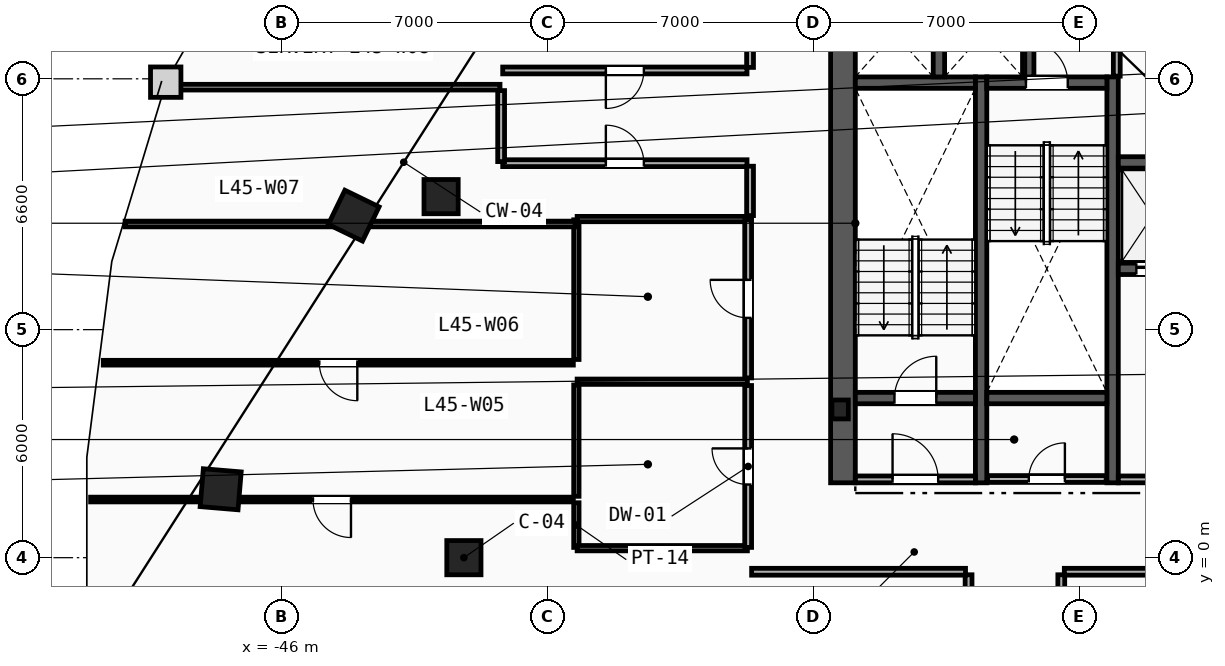
"""IFC4 building model, lengths in metres.
Left out: names, types, materials, properties, quantities, classifications, styles, units other than length and angle.
Written with IfcOpenShell. Run it as: python <this file> out.ifc"""

import sys

from ifc_helpers import new_model, si_unit, direction, frame, frame_2d, origin, origin_2d, place, context, subcontext, project, spatial, rectangle, i_section, extrude, element, fill, save


model = new_model("IFC4")
c1 = context("Model", 3, precision=1e-05, world=origin(), true_north=direction((0.0, 1.0)))
c2 = subcontext(c1, "Body", "Model", "MODEL_VIEW")
j1 = project(units=[si_unit("LENGTHUNIT", "METRE"), si_unit("PLANEANGLEUNIT", "RADIAN")], contexts=[c1])
p1 = place(None, origin())
s1 = spatial("IfcSite", under=j1, at=p1, CompositionType="ELEMENT")
p2 = place(p1, origin())
s2 = spatial("IfcBuilding", under=s1, at=p2, CompositionType="ELEMENT")
p3 = place(p2, frame((0.0, 0.0, 172.8)))
s3 = spatial("IfcBuildingStorey", under=s2, at=p3, CompositionType="ELEMENT", Elevation=172.8)
p4 = place(p3, frame((-31.3, 3.9, 0.0), z_axis=(0.0, 0.0, 1.0), x_axis=(1.0, 0.0, 0.0)))
e1 = element("IfcColumn", 1, at=p4, inside=s3, PredefinedType="COLUMN", context=c2, shape_type="SweptSolid", body=[
    extrude(i_section(OverallWidth=0.432, OverallDepth=0.498, WebThickness=0.056, FlangeThickness=0.089, FilletRadius=0.018, at=origin_2d()), origin(), (0.0, 0.0, 1.0), 3.6),
])
for number, where, z_axis, x_axis in (
    (2, (-41.2, 0.0, 0.0), (0.0, 0.0, 1.0), (1.0, 0.0, 0.0)),
    (3, (-41.8, 9.5, 0.0), (0.0, 0.0, 1.0), (1.0, 0.0, 0.0)),
):
    element("IfcColumn", number, at=place(p3, frame(where, z_axis=z_axis, x_axis=x_axis)), inside=s3, PredefinedType="COLUMN", context=c2, shape_type="SweptSolid", body=[
        extrude(rectangle(XDim=0.9, YDim=0.9, at=origin_2d()), origin(), (0.0, 0.0, 1.0), 3.6),
    ])
for number, where, z_axis, x_axis in (
    (4, (-44.1, 9.0, 0.0), (0.0, 0.0, 1.0), (-0.437, -0.899, 0.0)),
    (5, (-47.6, 1.8, 0.0), (0.0, 0.0, 1.0), (-0.084, -0.997, 0.0)),
):
    element("IfcColumn", number, at=place(p3, frame(where, z_axis=z_axis, x_axis=x_axis)), inside=s3, PredefinedType="COLUMN", context=c2, shape_type="SweptSolid", body=[
        extrude(rectangle(XDim=1.0, YDim=1.0, at=origin_2d()), origin(), (0.0, 0.0, 1.0), 3.6),
    ])
p5 = place(p3, frame((-31.225, 1.97, 0.0), z_axis=(0.0, 0.0, 1.0), x_axis=(0.0, 1.0, 0.0)))
e6 = element("IfcWall", 6, at=p5, inside=s3, PredefinedType="SHEAR", context=c2, shape_type="SweptSolid", body=[
    extrude(rectangle(XDim=13.33, YDim=0.65, at=frame_2d((6.665, 0.0))), origin(), (0.0, 0.0, 1.0), 3.36),
])
for number, where, z_axis, x_axis in (
    (7, (-27.59, 1.97, 0.0), (0.0, 0.0, 1.0), (0.0, 1.0, 0.0)),
    (8, (-24.13, 1.97, 0.0), (0.0, 0.0, 1.0), (0.0, 1.0, 0.0)),
):
    element("IfcWall", number, at=place(p3, frame(where, z_axis=z_axis, x_axis=x_axis)), inside=s3, PredefinedType="SHEAR", context=c2, shape_type="SweptSolid", body=[
        extrude(rectangle(XDim=10.68, YDim=0.3, at=frame_2d((5.34, 0.0))), origin(), (0.0, 0.0, 1.0), 3.36),
    ])
p6 = place(p3, frame((-30.9, 4.2, 0.0), z_axis=(0.0, 0.0, 1.0), x_axis=(1.0, 0.0, 0.0)))
e9 = element("IfcWall", 9, at=p6, inside=s3, PredefinedType="SHEAR", context=c2, shape_type="SweptSolid", body=[
    extrude(rectangle(XDim=3.16, YDim=0.3, at=frame_2d((1.58, 0.0))), origin(), (0.0, 0.0, 1.0), 3.36),
])
p7 = place(p6, frame((1.03, 0.0, 0.0)))
e10 = element("IfcOpeningElement", 10, at=p7, cuts=e9, PredefinedType="OPENING", context=c2, shape_type="SweptSolid", body=[
    extrude(rectangle(XDim=1.1, YDim=2.15, at=frame_2d((0.55, 1.075))), frame((0.0, 0.16, 0.0), z_axis=(0.0, -1.0, 0.0), x_axis=(1.0, 0.0, 0.0)), (0.0, 0.0, 1.0), 0.32),
])
p8 = place(p3, frame((-30.9, 12.5, 0.0), z_axis=(0.0, 0.0, 1.0), x_axis=(1.0, 0.0, 0.0)))
e11 = element("IfcWall", 11, at=p8, inside=s3, PredefinedType="SHEAR", context=c2, shape_type="SweptSolid", body=[
    extrude(rectangle(XDim=3.16, YDim=0.3, at=frame_2d((1.58, 0.0))), origin(), (0.0, 0.0, 1.0), 3.36),
])
p9 = place(p3, frame((-27.44, 12.5, 0.0), z_axis=(0.0, 0.0, 1.0), x_axis=(1.0, 0.0, 0.0)))
e12 = element("IfcWall", 12, at=p9, inside=s3, PredefinedType="SHEAR", context=c2, shape_type="SweptSolid", body=[
    extrude(rectangle(XDim=3.16, YDim=0.3, at=frame_2d((1.58, 0.0))), origin(), (0.0, 0.0, 1.0), 3.36),
])
p10 = place(p9, frame((1.03, 0.0, 0.0)))
e13 = element("IfcOpeningElement", 13, at=p10, cuts=e12, PredefinedType="OPENING", context=c2, shape_type="SweptSolid", body=[
    extrude(rectangle(XDim=1.1, YDim=2.15, at=frame_2d((0.55, 1.075))), frame((0.0, 0.16, 0.0), z_axis=(0.0, -1.0, 0.0), x_axis=(1.0, 0.0, 0.0)), (0.0, 0.0, 1.0), 0.32),
])
p11 = place(p3, frame((-27.44, 4.2, 0.0), z_axis=(0.0, 0.0, 1.0), x_axis=(1.0, 0.0, 0.0)))
e14 = element("IfcWall", 14, at=p11, inside=s3, PredefinedType="SHEAR", context=c2, shape_type="SweptSolid", body=[
    extrude(rectangle(XDim=3.16, YDim=0.3, at=frame_2d((1.58, 0.0))), origin(), (0.0, 0.0, 1.0), 3.36),
])
p12 = place(p3, frame((-23.98, 2.06, 0.0), z_axis=(0.0, 0.0, 1.0), x_axis=(1.0, 0.0, 0.0)))
e15 = element("IfcWall", 15, at=p12, inside=s3, PredefinedType="PARTITIONING", context=c2, shape_type="SweptSolid", body=[
    extrude(rectangle(XDim=3.0, YDim=0.18, at=frame_2d((1.5, 0.0))), origin(), (0.0, 0.0, 1.0), 3.36),
])
p13 = place(p12, frame((0.9, 0.0, 0.0)))
e16 = element("IfcOpeningElement", 16, at=p13, cuts=e15, PredefinedType="OPENING", context=c2, shape_type="SweptSolid", body=[
    extrude(rectangle(XDim=1.2, YDim=2.15, at=frame_2d((0.6, 1.075))), frame((0.0, 0.1, 0.0), z_axis=(0.0, -1.0, 0.0), x_axis=(1.0, 0.0, 0.0)), (0.0, 0.0, 1.0), 0.2),
])
p14 = place(p3, frame((-30.9, 2.06, 0.0), z_axis=(0.0, 0.0, 1.0), x_axis=(1.0, 0.0, 0.0)))
e17 = element("IfcWall", 17, at=p14, inside=s3, PredefinedType="PARTITIONING", context=c2, shape_type="SweptSolid", body=[
    extrude(rectangle(XDim=3.16, YDim=0.18, at=frame_2d((1.58, 0.0))), origin(), (0.0, 0.0, 1.0), 3.36),
])
p15 = place(p14, frame((0.98, 0.0, 0.0)))
e18 = element("IfcOpeningElement", 18, at=p15, cuts=e17, PredefinedType="OPENING", context=c2, shape_type="SweptSolid", body=[
    extrude(rectangle(XDim=1.2, YDim=2.15, at=frame_2d((0.6, 1.075))), frame((0.0, 0.1, 0.0), z_axis=(0.0, -1.0, 0.0), x_axis=(1.0, 0.0, 0.0)), (0.0, 0.0, 1.0), 0.2),
])
p16 = place(p3, frame((-23.98, 7.6, 0.0), z_axis=(0.0, 0.0, 1.0), x_axis=(1.0, 0.0, 0.0)))
e19 = element("IfcWall", 19, at=p16, inside=s3, PredefinedType="SHEAR", context=c2, shape_type="SweptSolid", body=[
    extrude(rectangle(XDim=2.1, YDim=0.3, at=frame_2d((1.05, 0.0))), origin(), (0.0, 0.0, 1.0), 3.36),
])
p17 = place(p16, frame((0.475, 0.0, 0.0)))
e20 = element("IfcOpeningElement", 20, at=p17, cuts=e19, PredefinedType="OPENING", context=c2, shape_type="SweptSolid", body=[
    extrude(rectangle(XDim=1.15, YDim=2.2, at=frame_2d((0.575, 1.1))), frame((0.0, 0.16, 0.0), z_axis=(0.0, -1.0, 0.0), x_axis=(1.0, 0.0, 0.0)), (0.0, 0.0, 1.0), 0.32),
])
p18 = place(p3, frame((-23.98, 10.4, 0.0), z_axis=(0.0, 0.0, 1.0), x_axis=(1.0, 0.0, 0.0)))
e21 = element("IfcWall", 21, at=p18, inside=s3, PredefinedType="SHEAR", context=c2, shape_type="SweptSolid", body=[
    extrude(rectangle(XDim=2.1, YDim=0.3, at=frame_2d((1.05, 0.0))), origin(), (0.0, 0.0, 1.0), 3.36),
])
for number, where, z_axis, x_axis in (
    (22, (-28.7, 12.65, 0.0), (0.0, 0.0, 1.0), (0.0, 1.0, 0.0)),
    (23, (-26.35, 12.65, 0.0), (0.0, 0.0, 1.0), (0.0, 1.0, 0.0)),
):
    element("IfcWall", number, at=place(p3, frame(where, z_axis=z_axis, x_axis=x_axis)), inside=s3, PredefinedType="SHEAR", context=c2, shape_type="SweptSolid", body=[
        extrude(rectangle(XDim=2.3, YDim=0.3, at=frame_2d((1.15, 0.0))), origin(), (0.0, 0.0, 1.0), 3.36),
    ])
p19 = place(p3, frame((-27.42, 2.07, 0.0), z_axis=(0.0, 0.0, 1.0), x_axis=(1.0, 0.0, 0.0)))
e24 = element("IfcWall", 24, at=p19, inside=s3, PredefinedType="PARTITIONING", context=c2, shape_type="SweptSolid", body=[
    extrude(rectangle(XDim=3.12, YDim=0.18, at=frame_2d((1.56, 0.0))), origin(), (0.0, 0.0, 1.0), 3.36),
])
p20 = place(p19, frame((1.085, 0.0, 0.0)))
e25 = element("IfcOpeningElement", 25, at=p20, cuts=e24, PredefinedType="OPENING", context=c2, shape_type="SweptSolid", body=[
    extrude(rectangle(XDim=0.95, YDim=2.1, at=frame_2d((0.475, 1.05))), frame((0.0, 0.1, 0.0), z_axis=(0.0, -1.0, 0.0), x_axis=(1.0, 0.0, 0.0)), (0.0, 0.0, 1.0), 0.2),
])
p21 = place(p3, frame((-24.02, 12.67, 0.0), z_axis=(0.0, 0.0, 1.0), x_axis=(0.0, 1.0, 0.0)))
e26 = element("IfcWall", 26, at=p21, inside=s3, PredefinedType="PARTITIONING", context=c2, shape_type="SweptSolid", body=[
    extrude(rectangle(XDim=2.26, YDim=0.18, at=frame_2d((1.13, 0.0))), origin(), (0.0, 0.0, 1.0), 3.36),
])
p22 = place(p21, frame((0.655, 0.0, 0.0)))
e27 = element("IfcOpeningElement", 27, at=p22, cuts=e26, PredefinedType="OPENING", context=c2, shape_type="SweptSolid", body=[
    extrude(rectangle(XDim=0.95, YDim=2.1, at=frame_2d((0.475, 1.05))), frame((0.0, 0.1, 0.0), z_axis=(0.0, -1.0, 0.0), x_axis=(1.0, 0.0, 0.0)), (0.0, 0.0, 1.0), 0.2),
])
p23 = place(p3, frame((-38.24, 0.27, 0.0), z_axis=(0.0, 0.0, 1.0), x_axis=(0.0, 1.0, 0.0)))
e28 = element("IfcWall", 28, at=p23, inside=s3, PredefinedType="PARTITIONING", context=c2, shape_type="SweptSolid", body=[
    extrude(rectangle(XDim=1.175, YDim=0.14, at=frame_2d((0.587, 0.0))), origin(), (0.0, 0.0, 1.0), 3.36),
])
p24 = place(p3, frame((-38.24, 1.615, 0.0), z_axis=(0.0, 0.0, 1.0), x_axis=(0.0, 1.0, 0.0)))
e29 = element("IfcWall", 29, at=p24, inside=s3, PredefinedType="PARTITIONING", context=c2, shape_type="SweptSolid", body=[
    extrude(rectangle(XDim=2.93, YDim=0.14, at=frame_2d((1.465, 0.0))), origin(), (0.0, 0.0, 1.0), 3.36),
])
p25 = place(p3, frame((-38.24, 5.215, 0.0), z_axis=(0.0, 0.0, 1.0), x_axis=(0.0, 1.0, 0.0)))
e30 = element("IfcWall", 30, at=p25, inside=s3, PredefinedType="PARTITIONING", context=c2, shape_type="SweptSolid", body=[
    extrude(rectangle(XDim=3.675, YDim=0.14, at=frame_2d((1.837, 0.0))), origin(), (0.0, 0.0, 1.0), 3.36),
])
for number, where, z_axis, x_axis in (
    (31, (-38.22, 0.25, 0.0), (0.0, 0.0, 1.0), (1.0, 0.0, 0.0)),
    (32, (-38.22, 4.63, 0.0), (0.0, 0.0, 1.0), (1.0, 0.0, 0.0)),
    (33, (-38.22, 8.91, 0.0), (0.0, 0.0, 1.0), (1.0, 0.0, 0.0)),
):
    element("IfcWall", number, at=place(p3, frame(where, z_axis=z_axis, x_axis=x_axis)), inside=s3, PredefinedType="PARTITIONING", context=c2, shape_type="SweptSolid", body=[
        extrude(rectangle(XDim=4.48, YDim=0.14, at=frame_2d((2.24, 0.0))), origin(), (0.0, 0.0, 1.0), 3.36),
    ])
p26 = place(p3, frame((-33.72, 0.27, 0.0), z_axis=(0.0, 0.0, 1.0), x_axis=(0.0, 1.0, 0.0)))
e34 = element("IfcWall", 34, at=p26, inside=s3, PredefinedType="PARTITIONING", context=c2, shape_type="SweptSolid", body=[
    extrude(rectangle(XDim=4.26, YDim=0.18, at=frame_2d((2.13, 0.0))), origin(), (0.0, 0.0, 1.0), 3.36),
])
p27 = place(p26, frame((1.655, 0.0, 0.0)))
e35 = element("IfcOpeningElement", 35, at=p27, cuts=e34, PredefinedType="OPENING", context=c2, shape_type="SweptSolid", body=[
    extrude(rectangle(XDim=0.95, YDim=2.1, at=frame_2d((0.475, 1.05))), frame((0.0, 0.1, 0.0), z_axis=(0.0, -1.0, 0.0), x_axis=(1.0, 0.0, 0.0)), (0.0, 0.0, 1.0), 0.2),
])
p28 = place(p3, frame((-33.72, 4.73, 0.0), z_axis=(0.0, 0.0, 1.0), x_axis=(0.0, 1.0, 0.0)))
e36 = element("IfcWall", 36, at=p28, inside=s3, PredefinedType="PARTITIONING", context=c2, shape_type="SweptSolid", body=[
    extrude(rectangle(XDim=4.16, YDim=0.18, at=frame_2d((2.08, 0.0))), origin(), (0.0, 0.0, 1.0), 3.36),
])
p29 = place(p28, frame((1.58, 0.0, 0.0)))
e37 = element("IfcOpeningElement", 37, at=p29, cuts=e36, PredefinedType="OPENING", context=c2, shape_type="SweptSolid", body=[
    extrude(rectangle(XDim=1.0, YDim=2.15, at=frame_2d((0.5, 1.075))), frame((0.0, 0.1, 0.0), z_axis=(0.0, -1.0, 0.0), x_axis=(1.0, 0.0, 0.0)), (0.0, 0.0, 1.0), 0.2),
])
p30 = place(p3, frame((-50.115, 8.78, 0.0), z_axis=(0.0, 0.0, 1.0), x_axis=(1.0, 0.0, 0.0)))
e38 = element("IfcWall", 38, at=p30, inside=s3, PredefinedType="PARTITIONING", context=c2, shape_type="SweptSolid", body=[
    extrude(rectangle(XDim=11.845, YDim=0.15, at=frame_2d((5.922, 0.0))), origin(), (0.0, 0.0, 1.0), 3.36),
])
p31 = place(p3, frame((-49.024, 12.38, 0.0), z_axis=(0.0, 0.0, 1.0), x_axis=(1.0, 0.0, 0.0)))
e39 = element("IfcWall", 39, at=p31, inside=s3, PredefinedType="PARTITIONING", context=c2, shape_type="SweptSolid", body=[
    extrude(rectangle(XDim=8.774, YDim=0.15, at=frame_2d((4.387, 0.0))), origin(), (0.0, 0.0, 1.0), 3.36),
])
p32 = place(p3, frame((-27.92, -0.45, 0.0), z_axis=(0.0, 0.0, 1.0), x_axis=(0.0, -1.0, 0.0)))
e40 = element("IfcWall", 40, at=p32, inside=s3, PredefinedType="PARTITIONING", context=c2, shape_type="SweptSolid", body=[
    extrude(rectangle(XDim=6.17, YDim=0.18, at=frame_2d((3.085, 0.0))), origin(), (0.0, 0.0, 1.0), 3.36),
])
p33 = place(p32, frame((2.585, 0.0, 0.0)))
e41 = element("IfcOpeningElement", 41, at=p33, cuts=e40, PredefinedType="OPENING", context=c2, shape_type="SweptSolid", body=[
    extrude(rectangle(XDim=1.0, YDim=2.15, at=frame_2d((0.5, 1.075))), frame((0.0, 0.1, 0.0), z_axis=(0.0, -1.0, 0.0), x_axis=(1.0, 0.0, 0.0)), (0.0, 0.0, 1.0), 0.2),
])
p34 = place(p3, frame((-33.628, -0.37, 0.0), z_axis=(0.0, 0.0, 1.0), x_axis=(1.0, 0.0, 0.0)))
e42 = element("IfcWall", 42, at=p34, inside=s3, PredefinedType="PARTITIONING", context=c2, shape_type="SweptSolid", body=[
    extrude(rectangle(XDim=5.628, YDim=0.18, at=frame_2d((2.814, 0.0))), origin(), (0.0, 0.0, 1.0), 3.36),
])
p35 = place(p3, frame((-25.4, -0.37, 0.0), z_axis=(0.0, 0.0, 1.0), x_axis=(1.0, 0.0, 0.0)))
e43 = element("IfcWall", 43, at=p35, inside=s3, PredefinedType="PARTITIONING", context=c2, shape_type="SweptSolid", body=[
    extrude(rectangle(XDim=8.578, YDim=0.18, at=frame_2d((4.289, 0.0))), origin(), (0.0, 0.0, 1.0), 3.36),
])
p36 = place(p35, frame((3.789, 0.0, 0.0)))
e44 = element("IfcOpeningElement", 44, at=p36, cuts=e43, PredefinedType="OPENING", context=c2, shape_type="SweptSolid", body=[
    extrude(rectangle(XDim=1.0, YDim=2.15, at=frame_2d((0.5, 1.075))), frame((0.0, 0.1, 0.0), z_axis=(0.0, -1.0, 0.0), x_axis=(1.0, 0.0, 0.0)), (0.0, 0.0, 1.0), 0.2),
])
p37 = place(p3, frame((-25.48, -6.62, 0.0), z_axis=(0.0, 0.0, 1.0), x_axis=(0.0, 1.0, 0.0)))
e45 = element("IfcWall", 45, at=p37, inside=s3, PredefinedType="PARTITIONING", context=c2, shape_type="SweptSolid", body=[
    extrude(rectangle(XDim=6.17, YDim=0.18, at=frame_2d((3.085, 0.0))), origin(), (0.0, 0.0, 1.0), 3.36),
])
p38 = place(p3, frame((-40.178, 10.38, 0.0), z_axis=(0.0, 0.0, 1.0), x_axis=(1.0, 0.0, 0.0)))
e46 = element("IfcWall", 46, at=p38, inside=s3, PredefinedType="PARTITIONING", context=c2, shape_type="SweptSolid", body=[
    extrude(rectangle(XDim=6.428, YDim=0.18, at=frame_2d((3.214, 0.0))), origin(), (0.0, 0.0, 1.0), 3.36),
])
p39 = place(p38, frame((2.714, 0.0, 0.0)))
e47 = element("IfcOpeningElement", 47, at=p39, cuts=e46, PredefinedType="OPENING", context=c2, shape_type="SweptSolid", body=[
    extrude(rectangle(XDim=1.0, YDim=2.15, at=frame_2d((0.5, 1.075))), frame((0.0, 0.1, 0.0), z_axis=(0.0, -1.0, 0.0), x_axis=(1.0, 0.0, 0.0)), (0.0, 0.0, 1.0), 0.2),
])
p40 = place(p3, frame((-40.22, 12.29, 0.0), z_axis=(0.0, 0.0, 1.0), x_axis=(0.0, -1.0, 0.0)))
e48 = element("IfcWall", 48, at=p40, inside=s3, PredefinedType="PARTITIONING", context=c2, shape_type="SweptSolid", body=[
    extrude(rectangle(XDim=1.869, YDim=0.18, at=frame_2d((0.934, 0.0))), origin(), (0.0, 0.0, 1.0), 3.36),
])
p41 = place(p3, frame((-33.67, 10.3, 0.0), z_axis=(0.0, 0.0, 1.0), x_axis=(0.0, -1.0, 0.0)))
e49 = element("IfcWall", 49, at=p41, inside=s3, PredefinedType="PARTITIONING", context=c2, shape_type="SweptSolid", body=[
    extrude(rectangle(XDim=1.299, YDim=0.18, at=frame_2d((0.649, 0.0))), origin(), (0.0, 0.0, 1.0), 3.36),
])
p42 = place(p3, frame((-33.75, 12.82, 0.0), z_axis=(0.0, 0.0, 1.0), x_axis=(-1.0, 0.0, 0.0)))
e50 = element("IfcWall", 50, at=p42, inside=s3, PredefinedType="PARTITIONING", context=c2, shape_type="SweptSolid", body=[
    extrude(rectangle(XDim=6.428, YDim=0.18, at=frame_2d((3.214, 0.0))), origin(), (0.0, 0.0, 1.0), 3.36),
])
p43 = place(p42, frame((2.714, 0.0, 0.0)))
e51 = element("IfcOpeningElement", 51, at=p43, cuts=e50, PredefinedType="OPENING", context=c2, shape_type="SweptSolid", body=[
    extrude(rectangle(XDim=1.0, YDim=2.15, at=frame_2d((0.5, 1.075))), frame((0.0, 0.1, 0.0), z_axis=(0.0, -1.0, 0.0), x_axis=(1.0, 0.0, 0.0)), (0.0, 0.0, 1.0), 0.2),
])
p44 = place(p3, frame((-33.67, 17.428, 0.0), z_axis=(0.0, 0.0, 1.0), x_axis=(0.0, -1.0, 0.0)))
e52 = element("IfcWall", 52, at=p44, inside=s3, PredefinedType="PARTITIONING", context=c2, shape_type="SweptSolid", body=[
    extrude(rectangle(XDim=4.529, YDim=0.18, at=frame_2d((2.264, 0.0))), origin(), (0.0, 0.0, 1.0), 3.36),
])
p45 = place(p3, frame((-38.32, 1.53, 0.0), z_axis=(0.0, 0.0, 1.0), x_axis=(-1.0, 0.0, 0.0)))
e53 = element("IfcWall", 53, at=p45, inside=s3, PredefinedType="PARTITIONING", context=c2, shape_type="SweptSolid", body=[
    extrude(rectangle(XDim=12.702, YDim=0.125, at=frame_2d((6.351, 0.0))), origin(), (0.0, 0.0, 1.0), 3.36),
])
p46 = place(p45, frame((5.851, 0.0, 0.0)))
e54 = element("IfcOpeningElement", 54, at=p46, cuts=e53, PredefinedType="OPENING", context=c2, shape_type="SweptSolid", body=[
    extrude(rectangle(XDim=1.0, YDim=2.15, at=frame_2d((0.5, 1.075))), frame((0.0, 0.073, 0.0), z_axis=(0.0, -1.0, 0.0), x_axis=(1.0, 0.0, 0.0)), (0.0, 0.0, 1.0), 0.145),
])
p47 = place(p3, frame((-38.32, 5.13, 0.0), z_axis=(0.0, 0.0, 1.0), x_axis=(-1.0, 0.0, 0.0)))
e55 = element("IfcWall", 55, at=p47, inside=s3, PredefinedType="PARTITIONING", context=c2, shape_type="SweptSolid", body=[
    extrude(rectangle(XDim=12.369, YDim=0.125, at=frame_2d((6.184, 0.0))), origin(), (0.0, 0.0, 1.0), 3.36),
])
p48 = place(p47, frame((5.684, 0.0, 0.0)))
e56 = element("IfcOpeningElement", 56, at=p48, cuts=e55, PredefinedType="OPENING", context=c2, shape_type="SweptSolid", body=[
    extrude(rectangle(XDim=1.0, YDim=2.15, at=frame_2d((0.5, 1.075))), frame((0.0, 0.073, 0.0), z_axis=(0.0, -1.0, 0.0), x_axis=(1.0, 0.0, 0.0)), (0.0, 0.0, 1.0), 0.145),
])
p49 = place(p7, origin())
e57 = element("IfcDoor", 57, at=p49, inside=s3, OperationType="SINGLE_SWING_RIGHT", PredefinedType="DOOR", context=c2, shape_type="SweptSolid", body=[
    extrude(rectangle(XDim=1.1, YDim=2.15, at=frame_2d((0.55, 1.075))), frame((0.0, 0.025, 0.0), z_axis=(0.0, -1.0, 0.0), x_axis=(1.0, 0.0, 0.0)), (0.0, 0.0, 1.0), 0.05),
])
fill(e10, e57)
p50 = place(p10, origin())
e58 = element("IfcDoor", 58, at=p50, inside=s3, OperationType="SINGLE_SWING_LEFT", PredefinedType="DOOR", context=c2, shape_type="SweptSolid", body=[
    extrude(rectangle(XDim=1.1, YDim=2.15, at=frame_2d((0.55, 1.075))), frame((0.0, 0.025, 0.0), z_axis=(0.0, -1.0, 0.0), x_axis=(1.0, 0.0, 0.0)), (0.0, 0.0, 1.0), 0.05),
])
fill(e13, e58)
p51 = place(p15, origin())
e59 = element("IfcDoor", 59, at=p51, inside=s3, OperationType="SINGLE_SWING_LEFT", PredefinedType="DOOR", context=c2, shape_type="SweptSolid", body=[
    extrude(rectangle(XDim=1.2, YDim=2.15, at=frame_2d((0.6, 1.075))), frame((0.0, 0.025, 0.0), z_axis=(0.0, -1.0, 0.0), x_axis=(1.0, 0.0, 0.0)), (0.0, 0.0, 1.0), 0.05),
])
fill(e18, e59)
p52 = place(p17, origin())
e60 = element("IfcDoor", 60, at=p52, inside=s3, OperationType="SLIDING_TO_LEFT", PredefinedType="TRAPDOOR", context=c2, shape_type="SweptSolid", body=[
    extrude(rectangle(XDim=1.15, YDim=2.2, at=frame_2d((0.575, 1.1))), frame((0.0, 0.025, 0.0), z_axis=(0.0, -1.0, 0.0), x_axis=(1.0, 0.0, 0.0)), (0.0, 0.0, 1.0), 0.05),
])
fill(e20, e60)
p53 = place(p46, origin())
e61 = element("IfcDoor", 61, at=p53, inside=s3, OperationType="SINGLE_SWING_LEFT", PredefinedType="DOOR", context=c2, shape_type="SweptSolid", body=[
    extrude(rectangle(XDim=1.0, YDim=2.15, at=frame_2d((0.5, 1.075))), frame((0.0, 0.025, 0.0), z_axis=(0.0, -1.0, 0.0), x_axis=(1.0, 0.0, 0.0)), (0.0, 0.0, 1.0), 0.05),
])
fill(e54, e61)
p54 = place(p48, origin())
e62 = element("IfcDoor", 62, at=p54, inside=s3, OperationType="SINGLE_SWING_LEFT", PredefinedType="DOOR", context=c2, shape_type="SweptSolid", body=[
    extrude(rectangle(XDim=1.0, YDim=2.15, at=frame_2d((0.5, 1.075))), frame((0.0, 0.025, 0.0), z_axis=(0.0, -1.0, 0.0), x_axis=(1.0, 0.0, 0.0)), (0.0, 0.0, 1.0), 0.05),
])
fill(e56, e62)
p55 = place(p39, origin())
e63 = element("IfcDoor", 63, at=p55, inside=s3, OperationType="SINGLE_SWING_LEFT", PredefinedType="DOOR", context=c2, shape_type="SweptSolid", body=[
    extrude(rectangle(XDim=1.0, YDim=2.15, at=frame_2d((0.5, 1.075))), frame((0.0, 0.025, 0.0), z_axis=(0.0, -1.0, 0.0), x_axis=(1.0, 0.0, 0.0)), (0.0, 0.0, 1.0), 0.05),
])
fill(e47, e63)
p56 = place(p43, origin())
e64 = element("IfcDoor", 64, at=p56, inside=s3, OperationType="SINGLE_SWING_RIGHT", PredefinedType="DOOR", context=c2, shape_type="SweptSolid", body=[
    extrude(rectangle(XDim=1.0, YDim=2.15, at=frame_2d((0.5, 1.075))), frame((0.0, 0.025, 0.0), z_axis=(0.0, -1.0, 0.0), x_axis=(1.0, 0.0, 0.0)), (0.0, 0.0, 1.0), 0.05),
])
fill(e51, e64)
p57 = place(p27, origin())
e65 = element("IfcDoor", 65, at=p57, inside=s3, OperationType="SINGLE_SWING_RIGHT", PredefinedType="DOOR", context=c2, shape_type="SweptSolid", body=[
    extrude(rectangle(XDim=0.95, YDim=2.1, at=frame_2d((0.475, 1.05))), frame((0.0, 0.025, 0.0), z_axis=(0.0, -1.0, 0.0), x_axis=(1.0, 0.0, 0.0)), (0.0, 0.0, 1.0), 0.05),
])
fill(e35, e65)
p58 = place(p29, origin())
e66 = element("IfcDoor", 66, at=p58, inside=s3, OperationType="SINGLE_SWING_RIGHT", PredefinedType="DOOR", context=c2, shape_type="SweptSolid", body=[
    extrude(rectangle(XDim=1.0, YDim=2.15, at=frame_2d((0.5, 1.075))), frame((0.0, 0.025, 0.0), z_axis=(0.0, -1.0, 0.0), x_axis=(1.0, 0.0, 0.0)), (0.0, 0.0, 1.0), 0.05),
])
fill(e37, e66)
p59 = place(p20, origin())
e67 = element("IfcDoor", 67, at=p59, inside=s3, OperationType="SINGLE_SWING_RIGHT", PredefinedType="DOOR", context=c2, shape_type="SweptSolid", body=[
    extrude(rectangle(XDim=0.95, YDim=2.1, at=frame_2d((0.475, 1.05))), frame((0.0, 0.025, 0.0), z_axis=(0.0, -1.0, 0.0), x_axis=(1.0, 0.0, 0.0)), (0.0, 0.0, 1.0), 0.05),
])
fill(e25, e67)
save(model, sys.argv[1])
